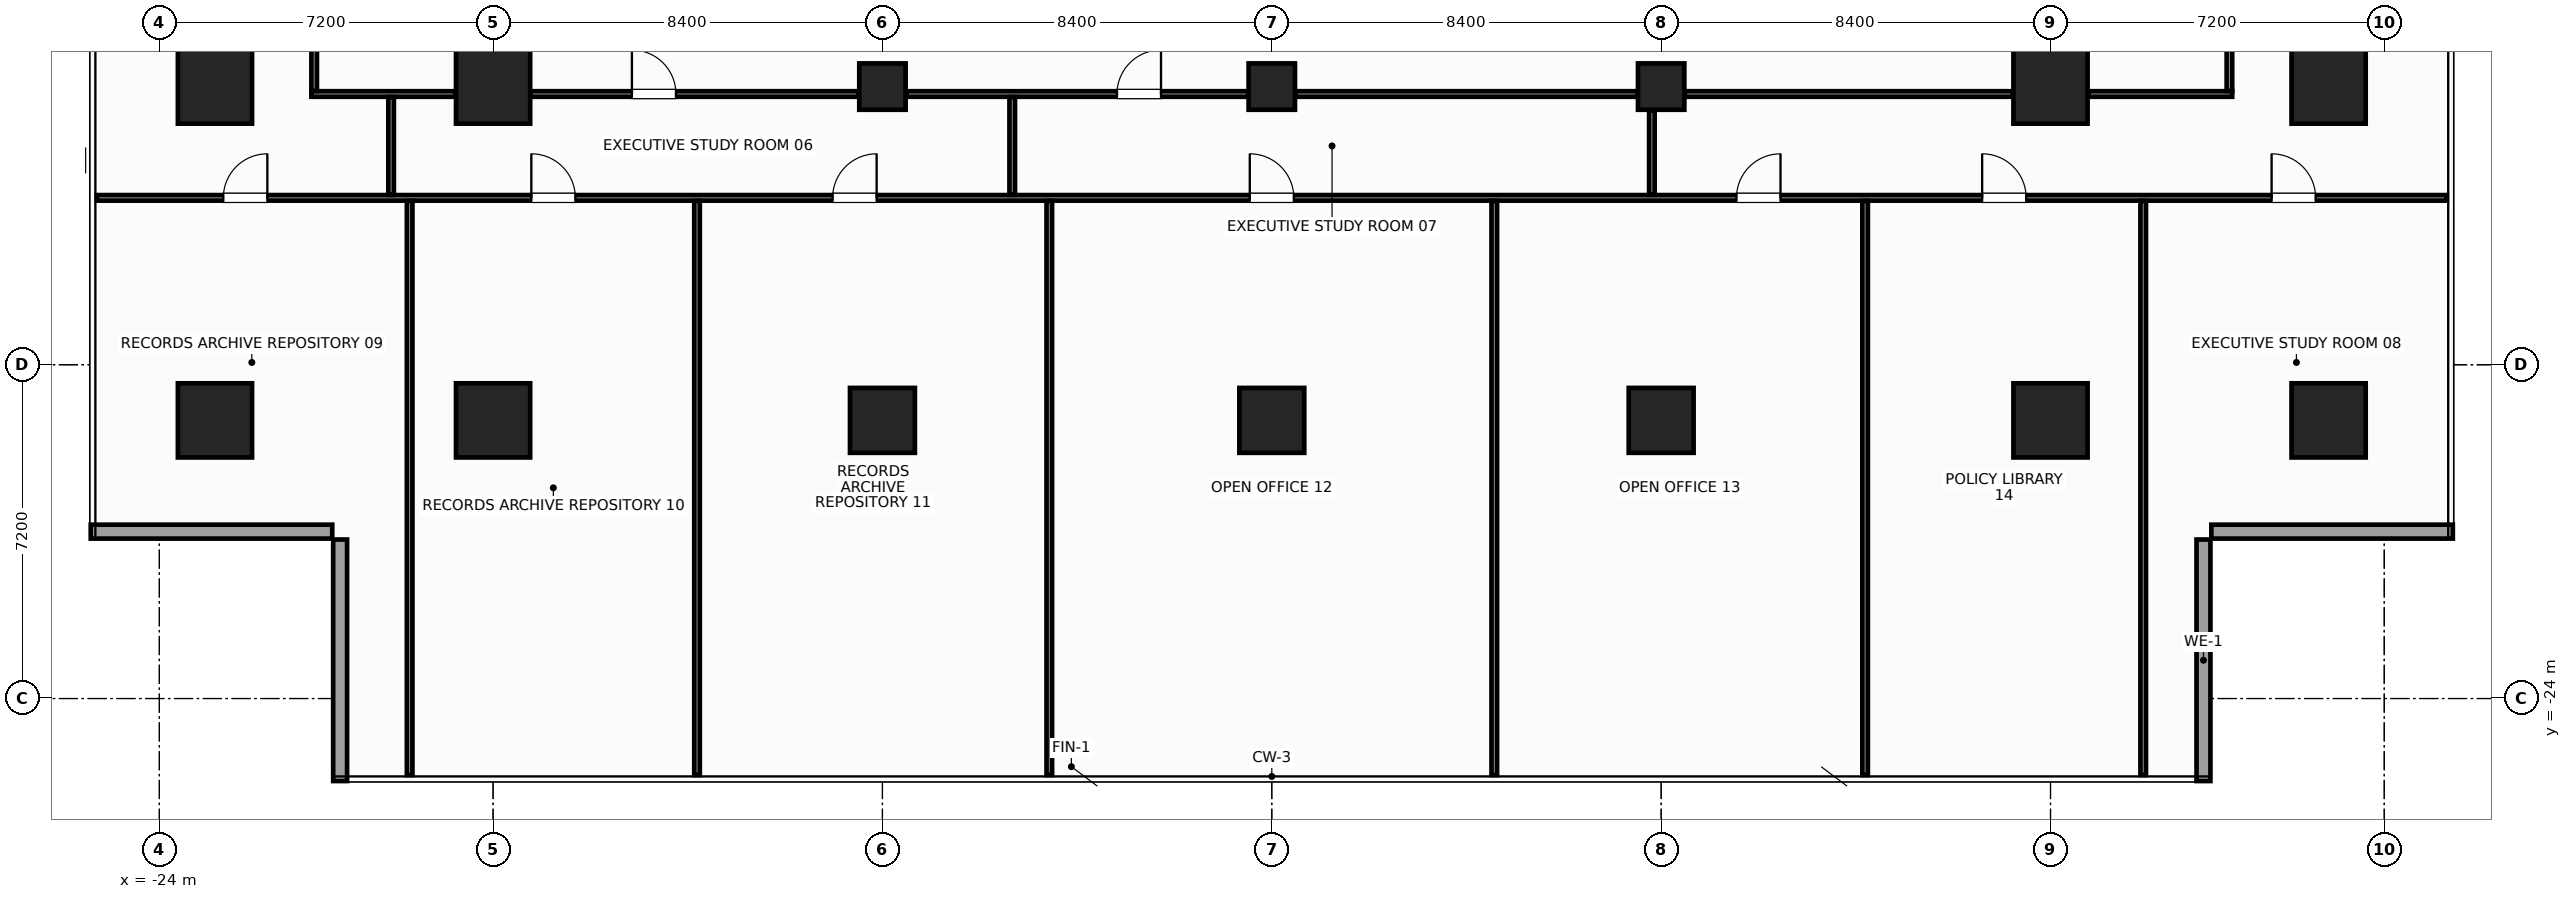
"""IFC4 building model, lengths in metres.
Left out: names, types, materials, properties, quantities, classifications, styles, units other than length and angle.
Written with IfcOpenShell. Run it as: python <this file> out.ifc"""

import sys

from ifc_helpers import new_model, si_unit, direction, frame, frame_2d, origin, origin_2d, place, context, subcontext, project, spatial, rectangle, hollow_rectangle, extrude, source, transform, mapped, element, fill, save


model = new_model("IFC4")
c1 = context("Model", 3, precision=1e-05, world=origin(), true_north=direction((0.0, 1.0)))
c2 = subcontext(c1, "Body", "Model", "MODEL_VIEW")
j1 = project(units=[si_unit("LENGTHUNIT", "METRE"), si_unit("PLANEANGLEUNIT", "RADIAN")], contexts=[c1])
p1 = place(None, origin())
s1 = spatial("IfcSite", under=j1, at=p1, CompositionType="ELEMENT")
p2 = place(p1, origin())
s2 = spatial("IfcBuilding", under=s1, at=p2, CompositionType="ELEMENT")
p3 = place(p2, frame((0.0, 0.0, 88.4)))
s3 = spatial("IfcBuildingStorey", under=s2, at=p3, CompositionType="ELEMENT", Elevation=88.4)
m1 = source(origin(), c2, "Body", "SweptSolid", [
    extrude(rectangle(XDim=1.6, YDim=1.6, at=origin_2d()), origin(), (0.0, 0.0, 1.0), 3.6),
])
for number, where, z_axis, x_axis in (
    (1, (-16.8, -18.0, 0.0), (0.0, 0.0, 1.0), (1.0, 0.0, 0.0)),
    (2, (-16.8, -10.8, 0.0), (0.0, 0.0, 1.0), (1.0, 0.0, 0.0)),
    (3, (16.8, -18.0, 0.0), (0.0, 0.0, 1.0), (1.0, 0.0, 0.0)),
    (4, (16.8, -10.8, 0.0), (0.0, 0.0, 1.0), (1.0, 0.0, 0.0)),
    (5, (-22.8, -18.0, 0.0), (0.0, 0.0, 1.0), (1.0, 0.0, 0.0)),
    (6, (-22.8, -10.8, 0.0), (0.0, 0.0, 1.0), (1.0, 0.0, 0.0)),
    (7, (22.8, -18.0, 0.0), (0.0, 0.0, 1.0), (1.0, 0.0, 0.0)),
    (8, (22.8, -10.8, 0.0), (0.0, 0.0, 1.0), (1.0, 0.0, 0.0)),
):
    element("IfcColumn", number, at=place(p3, frame(where, z_axis=z_axis, x_axis=x_axis)), inside=s3, PredefinedType="COLUMN", context=c2, shape_type="MappedRepresentation", body=[
        mapped(m1, transform((0.0, 0.0, 0.0), x_axis=(1.0, 0.0, 0.0), y_axis=(0.0, 1.0, 0.0), z_axis=(0.0, 0.0, 1.0), scale=1.0)),
    ])
m2 = source(origin(), c2, "Body", "SweptSolid", [
    extrude(rectangle(XDim=1.4, YDim=1.4, at=origin_2d()), origin(), (0.0, 0.0, 1.0), 3.6),
])
p4 = place(p3, frame((-8.4, -18.0, 0.0), z_axis=(0.0, 0.0, 1.0), x_axis=(1.0, 0.0, 0.0)))
e9 = element("IfcColumn", 9, at=p4, inside=s3, PredefinedType="COLUMN", context=c2, shape_type="MappedRepresentation", body=[
    mapped(m2, transform((0.0, 0.0, 0.0), x_axis=(1.0, 0.0, 0.0), y_axis=(0.0, 1.0, 0.0), z_axis=(0.0, 0.0, 1.0), scale=1.0)),
])
m3 = source(origin(), c2, "Body", "SweptSolid", [
    extrude(hollow_rectangle(XDim=1.0, YDim=1.0, WallThickness=0.045, at=origin_2d()), origin(), (0.0, 0.0, 1.0), 3.6),
])
p5 = place(p3, frame((-8.4, -10.8, 0.0), z_axis=(0.0, 0.0, 1.0), x_axis=(1.0, 0.0, 0.0)))
e10 = element("IfcColumn", 10, at=p5, inside=s3, PredefinedType="COLUMN", context=c2, shape_type="MappedRepresentation", body=[
    mapped(m3, transform((0.0, 0.0, 0.0), x_axis=(1.0, 0.0, 0.0), y_axis=(0.0, 1.0, 0.0), z_axis=(0.0, 0.0, 1.0), scale=1.0)),
])
p6 = place(p3, frame((8.4, -18.0, 0.0), z_axis=(0.0, 0.0, 1.0), x_axis=(1.0, 0.0, 0.0)))
e11 = element("IfcColumn", 11, at=p6, inside=s3, PredefinedType="COLUMN", context=c2, shape_type="MappedRepresentation", body=[
    mapped(m2, transform((0.0, 0.0, 0.0), x_axis=(1.0, 0.0, 0.0), y_axis=(0.0, 1.0, 0.0), z_axis=(0.0, 0.0, 1.0), scale=1.0)),
])
p7 = place(p3, frame((8.4, -10.8, 0.0), z_axis=(0.0, 0.0, 1.0), x_axis=(1.0, 0.0, 0.0)))
e12 = element("IfcColumn", 12, at=p7, inside=s3, PredefinedType="COLUMN", context=c2, shape_type="MappedRepresentation", body=[
    mapped(m3, transform((0.0, 0.0, 0.0), x_axis=(1.0, 0.0, 0.0), y_axis=(0.0, 1.0, 0.0), z_axis=(0.0, 0.0, 1.0), scale=1.0)),
])
p8 = place(p3, frame((0.0, -18.0, 0.0), z_axis=(0.0, 0.0, 1.0), x_axis=(1.0, 0.0, 0.0)))
e13 = element("IfcColumn", 13, at=p8, inside=s3, PredefinedType="COLUMN", context=c2, shape_type="MappedRepresentation", body=[
    mapped(m2, transform((0.0, 0.0, 0.0), x_axis=(1.0, 0.0, 0.0), y_axis=(0.0, 1.0, 0.0), z_axis=(0.0, 0.0, 1.0), scale=1.0)),
])
m4 = source(origin(), c2, "Body", "SweptSolid", [
    extrude(rectangle(XDim=1.0, YDim=1.0, at=origin_2d()), origin(), (0.0, 0.0, 1.0), 3.6),
])
p9 = place(p3, frame((0.0, -10.8, 0.0), z_axis=(0.0, 0.0, 1.0), x_axis=(1.0, 0.0, 0.0)))
e14 = element("IfcColumn", 14, at=p9, inside=s3, PredefinedType="COLUMN", context=c2, shape_type="MappedRepresentation", body=[
    mapped(m4, transform((0.0, 0.0, 0.0), x_axis=(1.0, 0.0, 0.0), y_axis=(0.0, 1.0, 0.0), z_axis=(0.0, 0.0, 1.0), scale=1.0)),
])
m5 = source(origin(), c2, "Body", "SweptSolid", [
    extrude(rectangle(XDim=5.21, YDim=0.3, at=frame_2d((2.605, 0.0))), origin(), (0.0, 0.0, 1.0), 2.74),
])
for number, where, z_axis, x_axis in (
    (15, (20.1, -25.78, 0.0), (0.0, 0.0, 1.0), (0.0, 1.0, 0.0)),
    (16, (20.27, -20.4, 0.0), (0.0, 0.0, 1.0), (1.0, 0.0, 0.0)),
    (17, (-25.48, -20.4, 0.0), (0.0, 0.0, 1.0), (1.0, 0.0, 0.0)),
    (18, (-20.1, -20.57, 0.0), (0.0, 0.0, 1.0), (0.0, -1.0, 0.0)),
):
    element("IfcWall", number, at=place(p3, frame(where, z_axis=z_axis, x_axis=x_axis)), inside=s3, PredefinedType="STANDARD", context=c2, shape_type="MappedRepresentation", body=[
        mapped(m5, transform((0.0, 0.0, 0.0), x_axis=(1.0, 0.0, 0.0), y_axis=(0.0, 1.0, 0.0), z_axis=(0.0, 0.0, 1.0), scale=1.0)),
    ])
m6 = source(origin(), c2, "Body", "SweptSolid", [
    extrude(rectangle(XDim=3.11, YDim=0.12, at=frame_2d((1.555, 0.0))), origin(), (0.0, 0.0, 1.0), 2.745),
])
p10 = place(p3, frame((-20.72, -10.96, 0.0), z_axis=(0.0, 0.0, 1.0), x_axis=(1.0, 0.0, 0.0)))
e19 = element("IfcWall", 19, at=p10, inside=s3, PredefinedType="PARTITIONING", context=c2, shape_type="MappedRepresentation", body=[
    mapped(m6, transform((0.0, 0.0, 0.0), x_axis=(1.0, 0.0, 0.0), y_axis=(0.0, 1.0, 0.0), z_axis=(0.0, 0.0, 1.0), scale=1.0)),
])
m7 = source(origin(), c2, "Body", "SweptSolid", [
    extrude(rectangle(XDim=7.08, YDim=0.12, at=frame_2d((3.54, 0.0))), origin(), (0.0, 0.0, 1.0), 2.745),
])
p11 = place(p3, frame((-15.99, -10.96, 0.0), z_axis=(0.0, 0.0, 1.0), x_axis=(1.0, 0.0, 0.0)))
e20 = element("IfcWall", 20, at=p11, inside=s3, PredefinedType="PARTITIONING", context=c2, shape_type="MappedRepresentation", body=[
    mapped(m7, transform((0.0, 0.0, 0.0), x_axis=(1.0, 0.0, 0.0), y_axis=(0.0, 1.0, 0.0), z_axis=(0.0, 0.0, 1.0), scale=1.0)),
])
p12 = place(p11, frame((2.185, 0.0, 0.0)))
e21 = element("IfcOpeningElement", 21, at=p12, cuts=e20, PredefinedType="OPENING", context=c2, shape_type="SweptSolid", body=[
    extrude(rectangle(XDim=0.95, YDim=2.15, at=frame_2d((0.475, 1.075))), frame((0.0, 0.072, 0.0), z_axis=(0.0, -1.0, 0.0), x_axis=(1.0, 0.0, 0.0)), (0.0, 0.0, 1.0), 0.144),
])
m8 = source(origin(), c2, "Body", "SweptSolid", [
    extrude(rectangle(XDim=7.38, YDim=0.12, at=frame_2d((3.69, 0.0))), origin(), (0.0, 0.0, 1.0), 2.745),
])
p13 = place(p3, frame((-7.89, -10.96, 0.0), z_axis=(0.0, 0.0, 1.0), x_axis=(1.0, 0.0, 0.0)))
e22 = element("IfcWall", 22, at=p13, inside=s3, PredefinedType="PARTITIONING", context=c2, shape_type="MappedRepresentation", body=[
    mapped(m8, transform((0.0, 0.0, 0.0), x_axis=(1.0, 0.0, 0.0), y_axis=(0.0, 1.0, 0.0), z_axis=(0.0, 0.0, 1.0), scale=1.0)),
])
p14 = place(p13, frame((4.55, 0.0, 0.0)))
e23 = element("IfcOpeningElement", 23, at=p14, cuts=e22, PredefinedType="OPENING", context=c2, shape_type="SweptSolid", body=[
    extrude(rectangle(XDim=0.95, YDim=2.15, at=frame_2d((0.475, 1.075))), frame((0.0, 0.072, 0.0), z_axis=(0.0, -1.0, 0.0), x_axis=(1.0, 0.0, 0.0)), (0.0, 0.0, 1.0), 0.144),
])
p15 = place(p3, frame((0.51, -10.96, 0.0), z_axis=(0.0, 0.0, 1.0), x_axis=(1.0, 0.0, 0.0)))
e24 = element("IfcWall", 24, at=p15, inside=s3, PredefinedType="PARTITIONING", context=c2, shape_type="MappedRepresentation", body=[
    mapped(m8, transform((0.0, 0.0, 0.0), x_axis=(1.0, 0.0, 0.0), y_axis=(0.0, 1.0, 0.0), z_axis=(0.0, 0.0, 1.0), scale=1.0)),
])
p16 = place(p3, frame((8.91, -10.96, 0.0), z_axis=(0.0, 0.0, 1.0), x_axis=(1.0, 0.0, 0.0)))
e25 = element("IfcWall", 25, at=p16, inside=s3, PredefinedType="PARTITIONING", context=c2, shape_type="MappedRepresentation", body=[
    mapped(m7, transform((0.0, 0.0, 0.0), x_axis=(1.0, 0.0, 0.0), y_axis=(0.0, 1.0, 0.0), z_axis=(0.0, 0.0, 1.0), scale=1.0)),
])
p17 = place(p3, frame((17.61, -10.96, 0.0), z_axis=(0.0, 0.0, 1.0), x_axis=(1.0, 0.0, 0.0)))
e26 = element("IfcWall", 26, at=p17, inside=s3, PredefinedType="PARTITIONING", context=c2, shape_type="MappedRepresentation", body=[
    mapped(m6, transform((0.0, 0.0, 0.0), x_axis=(1.0, 0.0, 0.0), y_axis=(0.0, 1.0, 0.0), z_axis=(0.0, 0.0, 1.0), scale=1.0)),
])
m9 = source(origin(), c2, "Body", "SweptSolid", [
    extrude(rectangle(XDim=2.09, YDim=0.12, at=frame_2d((1.045, 0.0))), origin(), (0.0, 0.0, 1.0), 3.36),
])
for number, where, z_axis, x_axis in (
    (27, (-20.66, -10.895, 0.0), (0.0, 0.0, 1.0), (0.0, 1.0, 0.0)),
    (28, (20.66, -10.895, 0.0), (0.0, 0.0, 1.0), (0.0, 1.0, 0.0)),
):
    element("IfcWall", number, at=place(p3, frame(where, z_axis=z_axis, x_axis=x_axis)), inside=s3, PredefinedType="PARTITIONING", context=c2, shape_type="MappedRepresentation", body=[
        mapped(m9, transform((0.0, 0.0, 0.0), x_axis=(1.0, 0.0, 0.0), y_axis=(0.0, 1.0, 0.0), z_axis=(0.0, 0.0, 1.0), scale=1.0)),
    ])
m10 = source(origin(), c2, "Body", "SweptSolid", [
    extrude(rectangle(XDim=50.7, YDim=0.12, at=frame_2d((25.35, 0.0))), origin(), (0.0, 0.0, 1.0), 2.945),
])
p18 = place(p3, frame((-25.35, -13.2, 0.0), z_axis=(0.0, 0.0, 1.0), x_axis=(1.0, 0.0, 0.0)))
e29 = element("IfcWall", 29, at=p18, inside=s3, PredefinedType="PARTITIONING", context=c2, shape_type="MappedRepresentation", body=[
    mapped(m10, transform((0.0, 0.0, 0.0), x_axis=(1.0, 0.0, 0.0), y_axis=(0.0, 1.0, 0.0), z_axis=(0.0, 0.0, 1.0), scale=1.0)),
])
p19 = place(p18, frame((46.92, 0.0, 0.0)))
e30 = element("IfcOpeningElement", 30, at=p19, cuts=e29, PredefinedType="OPENING", context=c2, shape_type="SweptSolid", body=[
    extrude(rectangle(XDim=0.95, YDim=2.15, at=frame_2d((0.475, 1.075))), frame((0.0, 0.072, 0.0), z_axis=(0.0, -1.0, 0.0), x_axis=(1.0, 0.0, 0.0)), (0.0, 0.0, 1.0), 0.144),
])
p20 = place(p18, frame((2.73, 0.0, 0.0)))
e31 = element("IfcOpeningElement", 31, at=p20, cuts=e29, PredefinedType="OPENING", context=c2, shape_type="SweptSolid", body=[
    extrude(rectangle(XDim=0.95, YDim=2.15, at=frame_2d((0.475, 1.075))), frame((0.0, 0.072, 0.0), z_axis=(0.0, -1.0, 0.0), x_axis=(1.0, 0.0, 0.0)), (0.0, 0.0, 1.0), 0.144),
])
p21 = place(p18, frame((9.375, 0.0, 0.0)))
e32 = element("IfcOpeningElement", 32, at=p21, cuts=e29, PredefinedType="OPENING", context=c2, shape_type="SweptSolid", body=[
    extrude(rectangle(XDim=0.95, YDim=2.15, at=frame_2d((0.475, 1.075))), frame((0.0, 0.072, 0.0), z_axis=(0.0, -1.0, 0.0), x_axis=(1.0, 0.0, 0.0)), (0.0, 0.0, 1.0), 0.144),
])
p22 = place(p18, frame((15.875, 0.0, 0.0)))
e33 = element("IfcOpeningElement", 33, at=p22, cuts=e29, PredefinedType="OPENING", context=c2, shape_type="SweptSolid", body=[
    extrude(rectangle(XDim=0.95, YDim=2.15, at=frame_2d((0.475, 1.075))), frame((0.0, 0.072, 0.0), z_axis=(0.0, -1.0, 0.0), x_axis=(1.0, 0.0, 0.0)), (0.0, 0.0, 1.0), 0.144),
])
p23 = place(p18, frame((24.875, 0.0, 0.0)))
e34 = element("IfcOpeningElement", 34, at=p23, cuts=e29, PredefinedType="OPENING", context=c2, shape_type="SweptSolid", body=[
    extrude(rectangle(XDim=0.95, YDim=2.15, at=frame_2d((0.475, 1.075))), frame((0.0, 0.072, 0.0), z_axis=(0.0, -1.0, 0.0), x_axis=(1.0, 0.0, 0.0)), (0.0, 0.0, 1.0), 0.144),
])
p24 = place(p18, frame((35.375, 0.0, 0.0)))
e35 = element("IfcOpeningElement", 35, at=p24, cuts=e29, PredefinedType="OPENING", context=c2, shape_type="SweptSolid", body=[
    extrude(rectangle(XDim=0.95, YDim=2.15, at=frame_2d((0.475, 1.075))), frame((0.0, 0.072, 0.0), z_axis=(0.0, -1.0, 0.0), x_axis=(1.0, 0.0, 0.0)), (0.0, 0.0, 1.0), 0.144),
])
p25 = place(p18, frame((40.675, 0.0, 0.0)))
e36 = element("IfcOpeningElement", 36, at=p25, cuts=e29, PredefinedType="OPENING", context=c2, shape_type="SweptSolid", body=[
    extrude(rectangle(XDim=0.95, YDim=2.15, at=frame_2d((0.475, 1.075))), frame((0.0, 0.072, 0.0), z_axis=(0.0, -1.0, 0.0), x_axis=(1.0, 0.0, 0.0)), (0.0, 0.0, 1.0), 0.144),
])
m11 = source(origin(), c2, "Body", "SweptSolid", [
    extrude(rectangle(XDim=2.11, YDim=0.12, at=frame_2d((1.055, 0.0))), origin(), (0.0, 0.0, 1.0), 3.36),
])
for number, where, z_axis, x_axis in (
    (37, (-19.0, -13.135, 0.0), (0.0, 0.0, 1.0), (0.0, 1.0, 0.0)),
    (38, (-5.6, -13.135, 0.0), (0.0, 0.0, 1.0), (0.0, 1.0, 0.0)),
):
    element("IfcWall", number, at=place(p3, frame(where, z_axis=z_axis, x_axis=x_axis)), inside=s3, PredefinedType="PARTITIONING", context=c2, shape_type="MappedRepresentation", body=[
        mapped(m11, transform((0.0, 0.0, 0.0), x_axis=(1.0, 0.0, 0.0), y_axis=(0.0, 1.0, 0.0), z_axis=(0.0, 0.0, 1.0), scale=1.0)),
    ])
m12 = source(origin(), c2, "Body", "SweptSolid", [
    extrude(rectangle(XDim=1.825, YDim=0.12, at=frame_2d((0.913, 0.0))), origin(), (0.0, 0.0, 1.0), 2.945),
])
p26 = place(p3, frame((8.2, -13.135, 0.0), z_axis=(0.0, 0.0, 1.0), x_axis=(0.0, 1.0, 0.0)))
e39 = element("IfcWall", 39, at=p26, inside=s3, PredefinedType="PARTITIONING", context=c2, shape_type="MappedRepresentation", body=[
    mapped(m12, transform((0.0, 0.0, 0.0), x_axis=(1.0, 0.0, 0.0), y_axis=(0.0, 1.0, 0.0), z_axis=(0.0, 0.0, 1.0), scale=1.0)),
])
m13 = source(origin(), c2, "Body", "SweptSolid", [
    extrude(rectangle(XDim=12.385, YDim=0.12, at=frame_2d((6.192, 0.0))), origin(), (0.0, 0.0, 1.0), 2.745),
])
for number, where, z_axis, x_axis in (
    (40, (-18.6, -25.65, 0.0), (0.0, 0.0, 1.0), (0.0, 1.0, 0.0)),
    (41, (-12.4, -25.65, 0.0), (0.0, 0.0, 1.0), (0.0, 1.0, 0.0)),
    (42, (-4.8, -25.65, 0.0), (0.0, 0.0, 1.0), (0.0, 1.0, 0.0)),
    (43, (4.8, -25.65, 0.0), (0.0, 0.0, 1.0), (0.0, 1.0, 0.0)),
    (44, (12.8, -25.65, 0.0), (0.0, 0.0, 1.0), (0.0, 1.0, 0.0)),
    (45, (18.8, -25.65, 0.0), (0.0, 0.0, 1.0), (0.0, 1.0, 0.0)),
):
    element("IfcWall", number, at=place(p3, frame(where, z_axis=z_axis, x_axis=x_axis)), inside=s3, PredefinedType="PARTITIONING", context=c2, shape_type="MappedRepresentation", body=[
        mapped(m13, transform((0.0, 0.0, 0.0), x_axis=(1.0, 0.0, 0.0), y_axis=(0.0, 1.0, 0.0), z_axis=(0.0, 0.0, 1.0), scale=1.0)),
    ])
m14 = source(origin(), c2, "Body", "SweptSolid", [
    extrude(rectangle(XDim=0.95, YDim=2.15, at=frame_2d((0.475, 1.075))), frame((0.0, 0.025, 0.0), z_axis=(0.0, -1.0, 0.0), x_axis=(1.0, 0.0, 0.0)), (0.0, 0.0, 1.0), 0.05),
])
p27 = place(p12, origin())
e46 = element("IfcDoor", 46, at=p27, inside=s3, OperationType="SINGLE_SWING_LEFT", PredefinedType="DOOR", context=c2, shape_type="MappedRepresentation", body=[
    mapped(m14, transform((0.0, 0.0, 0.0), x_axis=(1.0, 0.0, 0.0), y_axis=(0.0, 1.0, 0.0), z_axis=(0.0, 0.0, 1.0), scale=1.0)),
])
fill(e21, e46)
p28 = place(p14, origin())
e47 = element("IfcDoor", 47, at=p28, inside=s3, OperationType="SINGLE_SWING_RIGHT", PredefinedType="DOOR", context=c2, shape_type="MappedRepresentation", body=[
    mapped(m14, transform((0.0, 0.0, 0.0), x_axis=(1.0, 0.0, 0.0), y_axis=(0.0, 1.0, 0.0), z_axis=(0.0, 0.0, 1.0), scale=1.0)),
])
fill(e23, e47)
p29 = place(p19, origin())
e48 = element("IfcDoor", 48, at=p29, inside=s3, OperationType="SINGLE_SWING_LEFT", PredefinedType="DOOR", context=c2, shape_type="MappedRepresentation", body=[
    mapped(m14, transform((0.0, 0.0, 0.0), x_axis=(1.0, 0.0, 0.0), y_axis=(0.0, 1.0, 0.0), z_axis=(0.0, 0.0, 1.0), scale=1.0)),
])
fill(e30, e48)
p30 = place(p20, origin())
e49 = element("IfcDoor", 49, at=p30, inside=s3, OperationType="SINGLE_SWING_RIGHT", PredefinedType="DOOR", context=c2, shape_type="MappedRepresentation", body=[
    mapped(m14, transform((0.0, 0.0, 0.0), x_axis=(1.0, 0.0, 0.0), y_axis=(0.0, 1.0, 0.0), z_axis=(0.0, 0.0, 1.0), scale=1.0)),
])
fill(e31, e49)
p31 = place(p21, origin())
e50 = element("IfcDoor", 50, at=p31, inside=s3, OperationType="SINGLE_SWING_LEFT", PredefinedType="DOOR", context=c2, shape_type="MappedRepresentation", body=[
    mapped(m14, transform((0.0, 0.0, 0.0), x_axis=(1.0, 0.0, 0.0), y_axis=(0.0, 1.0, 0.0), z_axis=(0.0, 0.0, 1.0), scale=1.0)),
])
fill(e32, e50)
p32 = place(p22, origin())
e51 = element("IfcDoor", 51, at=p32, inside=s3, OperationType="SINGLE_SWING_RIGHT", PredefinedType="DOOR", context=c2, shape_type="MappedRepresentation", body=[
    mapped(m14, transform((0.0, 0.0, 0.0), x_axis=(1.0, 0.0, 0.0), y_axis=(0.0, 1.0, 0.0), z_axis=(0.0, 0.0, 1.0), scale=1.0)),
])
fill(e33, e51)
p33 = place(p23, origin())
e52 = element("IfcDoor", 52, at=p33, inside=s3, OperationType="SINGLE_SWING_LEFT", PredefinedType="DOOR", context=c2, shape_type="MappedRepresentation", body=[
    mapped(m14, transform((0.0, 0.0, 0.0), x_axis=(1.0, 0.0, 0.0), y_axis=(0.0, 1.0, 0.0), z_axis=(0.0, 0.0, 1.0), scale=1.0)),
])
fill(e34, e52)
p34 = place(p24, origin())
e53 = element("IfcDoor", 53, at=p34, inside=s3, OperationType="SINGLE_SWING_RIGHT", PredefinedType="DOOR", context=c2, shape_type="MappedRepresentation", body=[
    mapped(m14, transform((0.0, 0.0, 0.0), x_axis=(1.0, 0.0, 0.0), y_axis=(0.0, 1.0, 0.0), z_axis=(0.0, 0.0, 1.0), scale=1.0)),
])
fill(e35, e53)
p35 = place(p25, origin())
e54 = element("IfcDoor", 54, at=p35, inside=s3, OperationType="SINGLE_SWING_LEFT", PredefinedType="DOOR", context=c2, shape_type="MappedRepresentation", body=[
    mapped(m14, transform((0.0, 0.0, 0.0), x_axis=(1.0, 0.0, 0.0), y_axis=(0.0, 1.0, 0.0), z_axis=(0.0, 0.0, 1.0), scale=1.0)),
])
fill(e36, e54)
save(model, sys.argv[1])
